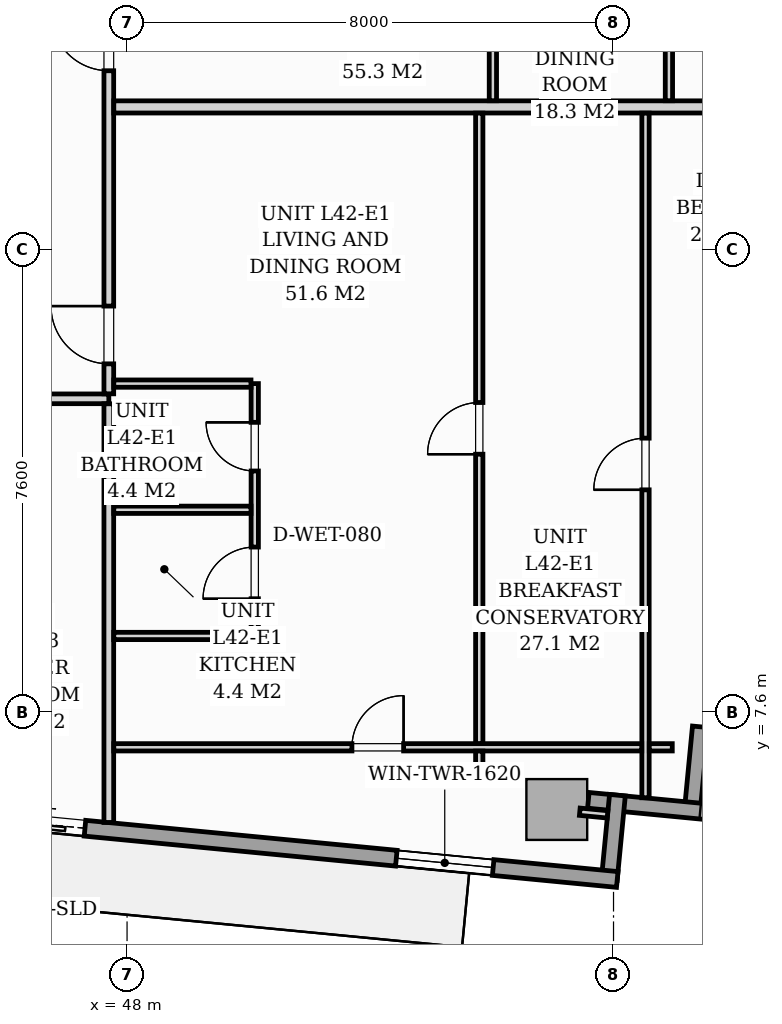
"""IFC4 building model, lengths in metres.
Left out: names, types, materials, properties, quantities, classifications, styles, units other than length and angle.
Written with IfcOpenShell. Run it as: python <this file> out.ifc"""

import sys

from ifc_helpers import new_model, si_unit, direction, frame, frame_2d, origin, origin_2d, place, context, subcontext, project, spatial, rectangle, extrude, source, transform, mapped, element, fill, save


model = new_model("IFC4")
c1 = context("Model", 3, precision=1e-05, world=origin(), true_north=direction((0.0, 1.0)))
c2 = subcontext(c1, "Body", "Model", "MODEL_VIEW")
j1 = project(units=[si_unit("LENGTHUNIT", "METRE"), si_unit("PLANEANGLEUNIT", "RADIAN")], contexts=[c1])
p1 = place(None, origin())
s1 = spatial("IfcSite", under=j1, at=p1, CompositionType="ELEMENT")
p2 = place(p1, origin())
s2 = spatial("IfcBuilding", under=s1, at=p2, CompositionType="ELEMENT")
p3 = place(p2, frame((0.0, 0.0, 147.0)))
s3 = spatial("IfcBuildingStorey", under=s2, at=p3, CompositionType="ELEMENT", Elevation=147.0)
m1 = source(origin(), c2, "Body", "SweptSolid", [
    extrude(rectangle(XDim=1.0, YDim=1.0, at=origin_2d()), origin(), (0.0, 0.0, 1.0), 3.196),
])
p4 = place(p3, frame((55.067, 5.996, 0.002), z_axis=(0.0, 0.0, 1.0), x_axis=(0.995396198367, -0.09584575252, 0.0)))
e1 = element("IfcColumn", 1, at=p4, inside=s3, PredefinedType="COLUMN", context=c2, shape_type="MappedRepresentation", body=[
    mapped(m1, transform((0.0, 0.0, 0.0), scale=1.0)),
])
p5 = place(p3, frame((57.428, 7.356, 0.0), z_axis=(0.0, 0.0, 1.0), x_axis=(-0.095915846097, -0.995389446633, 0.0)))
e2 = element("IfcWall", 2, at=p5, inside=s3, PredefinedType="STANDARD", context=c2, shape_type="SweptSolid", body=[
    extrude(rectangle(XDim=1.395, YDim=0.26, at=frame_2d((0.697, 0.0))), origin(), (0.0, 0.0, 1.0), 2.94),
])
p6 = place(p3, frame((57.555, 5.958, 0.0), z_axis=(0.0, 0.0, 1.0), x_axis=(-0.995401789159, 0.095787672171, 0.0)))
e3 = element("IfcWall", 3, at=p6, inside=s3, PredefinedType="STANDARD", context=c2, shape_type="SweptSolid", body=[
    extrude(rectangle(XDim=1.978, YDim=0.26, at=frame_2d((0.989, 0.0))), origin(), (0.0, 0.0, 1.0), 2.94),
])
p7 = place(p3, frame((56.064, 6.232, 0.0), z_axis=(0.0, 0.0, 1.0), x_axis=(-0.09589913835, -0.995391056452, 0.0)))
e4 = element("IfcWall", 4, at=p7, inside=s3, PredefinedType="STANDARD", context=c2, shape_type="SweptSolid", body=[
    extrude(rectangle(XDim=1.395, YDim=0.26, at=frame_2d((0.698, 0.0))), origin(), (0.0, 0.0, 1.0), 2.94),
])
p8 = place(p3, frame((56.061, 4.845, 0.0), z_axis=(0.0, 0.0, 1.0), x_axis=(-0.995395976631, 0.095848055311, 0.0)))
e5 = element("IfcWall", 5, at=p8, inside=s3, PredefinedType="STANDARD", context=c2, shape_type="SweptSolid", body=[
    extrude(rectangle(XDim=17.01, YDim=0.26, at=frame_2d((8.505, 0.0))), origin(), (0.0, 0.0, 1.0), 2.94),
])
p9 = place(p8, frame((8.794, 0.0, 0.0)))
e6 = element("IfcOpeningElement", 6, at=p9, cuts=e5, PredefinedType="OPENING", context=c2, shape_type="SweptSolid", body=[
    extrude(rectangle(XDim=1.8, YDim=2.06, at=frame_2d((0.9, 1.03))), frame((0.0, 0.14, 0.0), z_axis=(0.0, -1.0, 0.0), x_axis=(1.0, 0.0, 0.0)), (0.0, 0.0, 1.0), 0.28),
])
p10 = place(p8, frame((2.05, 0.0, 0.65)))
e7 = element("IfcOpeningElement", 7, at=p10, cuts=e5, PredefinedType="OPENING", context=c2, shape_type="SweptSolid", body=[
    extrude(rectangle(XDim=1.6, YDim=1.5, at=frame_2d((0.8, 0.75))), frame((0.0, 0.14, 0.0), z_axis=(0.0, -1.0, 0.0), x_axis=(1.0, 0.0, 0.0)), (0.0, 0.0, 1.0), 0.28),
])
p11 = place(p3, frame((22.05, 12.75, 0.0), z_axis=(0.0, 0.0, 1.0), x_axis=(1.0, 0.0, 0.0)))
e8 = element("IfcWall", 8, at=p11, inside=s3, PredefinedType="PARTITIONING", context=c2, shape_type="SweptSolid", body=[
    extrude(rectangle(XDim=25.65, YDim=0.16, at=frame_2d((12.825, 0.0))), origin(), (0.0, 0.0, 1.0), 2.94),
])
p12 = place(p11, frame((1.312, 0.0, 0.0)))
e9 = element("IfcOpeningElement", 9, at=p12, cuts=e8, PredefinedType="OPENING", context=c2, shape_type="SweptSolid", body=[
    extrude(rectangle(XDim=0.95, YDim=2.06, at=frame_2d((0.475, 1.03))), frame((0.0, 0.09, 0.0), z_axis=(0.0, -1.0, 0.0), x_axis=(1.0, 0.0, 0.0)), (0.0, 0.0, 1.0), 0.18),
])
p13 = place(p11, frame((8.281, 0.0, 0.0)))
e10 = element("IfcOpeningElement", 10, at=p13, cuts=e8, PredefinedType="OPENING", context=c2, shape_type="SweptSolid", body=[
    extrude(rectangle(XDim=0.95, YDim=2.06, at=frame_2d((0.475, 1.03))), frame((0.0, 0.09, 0.0), z_axis=(0.0, -1.0, 0.0), x_axis=(1.0, 0.0, 0.0)), (0.0, 0.0, 1.0), 0.18),
])
p14 = place(p11, frame((17.268, 0.0, 0.0)))
e11 = element("IfcOpeningElement", 11, at=p14, cuts=e8, PredefinedType="OPENING", context=c2, shape_type="SweptSolid", body=[
    extrude(rectangle(XDim=0.95, YDim=2.06, at=frame_2d((0.475, 1.03))), frame((0.0, 0.09, 0.0), z_axis=(0.0, -1.0, 0.0), x_axis=(1.0, 0.0, 0.0)), (0.0, 0.0, 1.0), 0.18),
])
p15 = place(p3, frame((47.7, 5.783, 0.0), z_axis=(0.0, 0.0, 1.0), x_axis=(0.0, 1.0, 0.0)))
e12 = element("IfcWall", 12, at=p15, inside=s3, PredefinedType="PARTITIONING", context=c2, shape_type="SweptSolid", body=[
    extrude(rectangle(XDim=6.885, YDim=0.16, at=frame_2d((3.442, 0.0))), origin(), (0.0, 0.0, 1.0), 2.94),
])
p16 = place(p3, frame((47.7, 12.832, 0.0), z_axis=(0.0, 0.0, 1.0), x_axis=(0.0, 1.0, 0.0)))
e13 = element("IfcWall", 13, at=p16, inside=s3, PredefinedType="PARTITIONING", context=c2, shape_type="SweptSolid", body=[
    extrude(rectangle(XDim=7.818, YDim=0.16, at=frame_2d((3.909, 0.0))), origin(), (0.0, 0.0, 1.0), 2.94),
])
p17 = place(p16, frame((0.493, 0.0, 0.0)))
e14 = element("IfcOpeningElement", 14, at=p17, cuts=e13, PredefinedType="OPENING", context=c2, shape_type="SweptSolid", body=[
    extrude(rectangle(XDim=0.95, YDim=2.06, at=frame_2d((0.475, 1.03))), frame((0.0, 0.09, 0.0), z_axis=(0.0, -1.0, 0.0), x_axis=(1.0, 0.0, 0.0)), (0.0, 0.0, 1.0), 0.18),
])
p18 = place(p16, frame((5.313, 0.0, 0.0)))
e15 = element("IfcOpeningElement", 15, at=p18, cuts=e13, PredefinedType="OPENING", context=c2, shape_type="SweptSolid", body=[
    extrude(rectangle(XDim=0.95, YDim=2.06, at=frame_2d((0.475, 1.03))), frame((0.0, 0.09, 0.0), z_axis=(0.0, -1.0, 0.0), x_axis=(1.0, 0.0, 0.0)), (0.0, 0.0, 1.0), 0.18),
])
p19 = place(p3, frame((47.782, 17.55, 0.0), z_axis=(0.0, 0.0, 1.0), x_axis=(1.0, 0.0, 0.0)))
e16 = element("IfcWall", 16, at=p19, inside=s3, PredefinedType="PARTITIONING", context=c2, shape_type="SweptSolid", body=[
    extrude(rectangle(XDim=11.934, YDim=0.2, at=frame_2d((5.967, 0.0))), origin(), (0.0, 0.0, 1.0), 2.94),
])
p20 = place(p3, frame((50.1, 8.85, 0.0), z_axis=(0.0, 0.0, 1.0), x_axis=(0.0, 1.0, 0.0)))
e17 = element("IfcWall", 17, at=p20, inside=s3, PredefinedType="PARTITIONING", context=c2, shape_type="SweptSolid", body=[
    extrude(rectangle(XDim=4.15, YDim=0.12, at=frame_2d((2.075, 0.0))), origin(), (0.0, 0.0, 1.0), 2.94),
])
p21 = place(p20, frame((0.612, 0.0, 0.0)))
e18 = element("IfcOpeningElement", 18, at=p21, cuts=e17, PredefinedType="OPENING", context=c2, shape_type="SweptSolid", body=[
    extrude(rectangle(XDim=0.85, YDim=2.05, at=frame_2d((0.425, 1.025))), frame((0.0, 0.07, 0.0), z_axis=(0.0, -1.0, 0.0), x_axis=(1.0, 0.0, 0.0)), (0.0, 0.0, 1.0), 0.14),
])
p22 = place(p20, frame((2.713, 0.0, 0.0)))
e19 = element("IfcOpeningElement", 19, at=p22, cuts=e17, PredefinedType="OPENING", context=c2, shape_type="SweptSolid", body=[
    extrude(rectangle(XDim=0.8, YDim=2.02, at=frame_2d((0.4, 1.01))), frame((0.0, 0.07, 0.0), z_axis=(0.0, -1.0, 0.0), x_axis=(1.0, 0.0, 0.0)), (0.0, 0.0, 1.0), 0.14),
])
for number, where, z_axis, x_axis in (
    (20, (47.782, 10.925, 0.0), (0.0, 0.0, 1.0), (1.0, 0.0, 0.0)),
    (21, (47.782, 8.85, 0.0), (0.0, 0.0, 1.0), (1.0, 0.0, 0.0)),
    (22, (47.782, 13.0, 0.0), (0.0, 0.0, 1.0), (1.0, 0.0, 0.0)),
):
    element("IfcWall", number, at=place(p3, frame(where, z_axis=z_axis, x_axis=x_axis)), inside=s3, PredefinedType="PARTITIONING", context=c2, shape_type="SweptSolid", body=[
        extrude(rectangle(XDim=2.256, YDim=0.12, at=frame_2d((1.128, 0.0))), origin(), (0.0, 0.0, 1.0), 2.94),
    ])
p23 = place(p3, frame((56.526, 6.189, 0.0), z_axis=(0.0, 0.0, 1.0), x_axis=(0.0, 1.0, 0.0)))
e23 = element("IfcWall", 23, at=p23, inside=s3, PredefinedType="PARTITIONING", context=c2, shape_type="SweptSolid", body=[
    extrude(rectangle(XDim=11.259, YDim=0.12, at=frame_2d((5.629, 0.0))), origin(), (0.0, 0.0, 1.0), 2.94),
])
p24 = place(p23, frame((5.064, 0.0, 0.0)))
e24 = element("IfcOpeningElement", 24, at=p24, cuts=e23, PredefinedType="OPENING", context=c2, shape_type="SweptSolid", body=[
    extrude(rectangle(XDim=0.85, YDim=2.05, at=frame_2d((0.425, 1.025))), frame((0.0, 0.07, 0.0), z_axis=(0.0, -1.0, 0.0), x_axis=(1.0, 0.0, 0.0)), (0.0, 0.0, 1.0), 0.14),
])
p25 = place(p3, frame((47.782, 7.019, 0.0), z_axis=(0.0, 0.0, 1.0), x_axis=(1.0, 0.0, 0.0)))
e25 = element("IfcWall", 25, at=p25, inside=s3, PredefinedType="PARTITIONING", context=c2, shape_type="SweptSolid", body=[
    extrude(rectangle(XDim=8.682, YDim=0.12, at=frame_2d((4.341, 0.0))), origin(), (0.0, 0.0, 1.0), 2.94),
])
p26 = place(p25, frame((3.916, 0.0, 0.0)))
e26 = element("IfcOpeningElement", 26, at=p26, cuts=e25, PredefinedType="OPENING", context=c2, shape_type="SweptSolid", body=[
    extrude(rectangle(XDim=0.85, YDim=2.05, at=frame_2d((0.425, 1.025))), frame((0.0, 0.07, 0.0), z_axis=(0.0, -1.0, 0.0), x_axis=(1.0, 0.0, 0.0)), (0.0, 0.0, 1.0), 0.14),
])
p27 = place(p3, frame((56.588, 7.019, 0.0), z_axis=(0.0, 0.0, 1.0), x_axis=(1.0, 0.0, 0.0)))
e27 = element("IfcWall", 27, at=p27, inside=s3, PredefinedType="PARTITIONING", context=c2, shape_type="SweptSolid", body=[
    extrude(rectangle(XDim=0.378, YDim=0.12, at=frame_2d((0.189, 0.0))), origin(), (0.0, 0.0, 1.0), 2.94),
])
p28 = place(p3, frame((53.792, 6.579, 0.0), z_axis=(0.0, 0.0, 1.0), x_axis=(0.0, 1.0, 0.0)))
e28 = element("IfcWall", 28, at=p28, inside=s3, PredefinedType="PARTITIONING", context=c2, shape_type="SweptSolid", body=[
    extrude(rectangle(XDim=0.378, YDim=0.12, at=frame_2d((0.189, 0.0))), origin(), (0.0, 0.0, 1.0), 2.94),
])
p29 = place(p3, frame((53.792, 7.081, 0.0), z_axis=(0.0, 0.0, 1.0), x_axis=(0.0, 1.0, 0.0)))
e29 = element("IfcWall", 29, at=p29, inside=s3, PredefinedType="PARTITIONING", context=c2, shape_type="SweptSolid", body=[
    extrude(rectangle(XDim=10.367, YDim=0.12, at=frame_2d((5.184, 0.0))), origin(), (0.0, 0.0, 1.0), 2.94),
])
p30 = place(p29, frame((4.758, 0.0, 0.0)))
e30 = element("IfcOpeningElement", 30, at=p30, cuts=e29, PredefinedType="OPENING", context=c2, shape_type="SweptSolid", body=[
    extrude(rectangle(XDim=0.85, YDim=2.05, at=frame_2d((0.425, 1.025))), frame((0.0, 0.07, 0.0), z_axis=(0.0, -1.0, 0.0), x_axis=(1.0, 0.0, 0.0)), (0.0, 0.0, 1.0), 0.14),
])
p31 = place(p3, frame((56.911, 17.652, 0.0), z_axis=(0.0, 0.0, 1.0), x_axis=(0.0, 1.0, 0.0)))
e31 = element("IfcWall", 31, at=p31, inside=s3, PredefinedType="PARTITIONING", context=c2, shape_type="SweptSolid", body=[
    extrude(rectangle(XDim=6.408, YDim=0.12, at=frame_2d((3.204, 0.0))), origin(), (0.0, 0.0, 1.0), 2.383),
])
p32 = place(p31, frame((2.266, 0.0, 0.0)))
e32 = element("IfcOpeningElement", 32, at=p32, cuts=e31, PredefinedType="OPENING", context=c2, shape_type="SweptSolid", body=[
    extrude(rectangle(XDim=0.85, YDim=2.05, at=frame_2d((0.425, 1.025))), frame((0.0, 0.07, 0.0), z_axis=(0.0, -1.0, 0.0), x_axis=(1.0, 0.0, 0.0)), (0.0, 0.0, 1.0), 0.14),
])
p33 = place(p3, frame((54.016, 17.652, 0.0), z_axis=(0.0, 0.0, 1.0), x_axis=(0.0, 1.0, 0.0)))
e33 = element("IfcWall", 33, at=p33, inside=s3, PredefinedType="PARTITIONING", context=c2, shape_type="SweptSolid", body=[
    extrude(rectangle(XDim=6.687, YDim=0.12, at=frame_2d((3.344, 0.0))), origin(), (0.0, 0.0, 1.0), 2.94),
])
p34 = place(p33, frame((3.016, 0.0, 0.0)))
e34 = element("IfcOpeningElement", 34, at=p34, cuts=e33, PredefinedType="OPENING", context=c2, shape_type="SweptSolid", body=[
    extrude(rectangle(XDim=0.85, YDim=2.05, at=frame_2d((0.425, 1.025))), frame((0.0, 0.07, 0.0), z_axis=(0.0, -1.0, 0.0), x_axis=(1.0, 0.0, 0.0)), (0.0, 0.0, 1.0), 0.14),
])
p35 = place(p3, frame((55.445, 5.96, 0.0), z_axis=(0.0, 0.0, 1.0), x_axis=(0.995384576284, -0.09596637586, 0.0)))
e35 = element("IfcWall", 35, at=p35, inside=s3, PredefinedType="PARTITIONING", context=c2, shape_type="SweptSolid", body=[
    extrude(rectangle(XDim=0.458, YDim=0.12, at=frame_2d((0.229, 0.0))), origin(), (0.0, 0.0, 1.0), 2.94),
])
m2 = source(origin(), c2, "Body", "SweptSolid", [
    extrude(rectangle(XDim=1.8, YDim=2.06, at=frame_2d((0.9, 1.03))), frame((0.0, 0.025, 0.0), z_axis=(0.0, -1.0, 0.0), x_axis=(1.0, 0.0, 0.0)), (0.0, 0.0, 1.0), 0.05),
])
p36 = place(p9, origin())
e36 = element("IfcDoor", 36, at=p36, inside=s3, OperationType="SLIDING_TO_RIGHT", PredefinedType="DOOR", context=c2, shape_type="MappedRepresentation", body=[
    mapped(m2, transform((0.0, 0.0, 0.0), scale=1.0)),
])
fill(e6, e36)
m3 = source(origin(), c2, "Body", "SweptSolid", [
    extrude(rectangle(XDim=1.6, YDim=1.5, at=frame_2d((0.8, 0.75))), frame((0.0, 0.03, 0.0), z_axis=(0.0, -1.0, 0.0), x_axis=(1.0, 0.0, 0.0)), (0.0, 0.0, 1.0), 0.06),
])
p37 = place(p10, origin())
e37 = element("IfcWindow", 37, at=p37, inside=s3, PartitioningType="SINGLE_PANEL", PredefinedType="WINDOW", context=c2, shape_type="MappedRepresentation", body=[
    mapped(m3, transform((0.0, 0.0, 0.0), scale=1.0)),
])
fill(e7, e37)
m4 = source(origin(), c2, "Body", "SweptSolid", [
    extrude(rectangle(XDim=0.95, YDim=2.06, at=frame_2d((0.475, 1.03))), frame((0.0, 0.025, 0.0), z_axis=(0.0, -1.0, 0.0), x_axis=(1.0, 0.0, 0.0)), (0.0, 0.0, 1.0), 0.05),
])
p38 = place(p17, origin())
e38 = element("IfcDoor", 38, at=p38, inside=s3, OperationType="SINGLE_SWING_RIGHT", PredefinedType="DOOR", context=c2, shape_type="MappedRepresentation", body=[
    mapped(m4, transform((0.0, 0.0, 0.0), scale=1.0)),
])
fill(e14, e38)
m5 = source(origin(), c2, "Body", "SweptSolid", [
    extrude(rectangle(XDim=0.85, YDim=2.05, at=frame_2d((0.425, 1.025))), frame((0.0, 0.025, 0.0), z_axis=(0.0, -1.0, 0.0), x_axis=(1.0, 0.0, 0.0)), (0.0, 0.0, 1.0), 0.05),
])
p39 = place(p21, origin())
e39 = element("IfcDoor", 39, at=p39, inside=s3, OperationType="SINGLE_SWING_LEFT", PredefinedType="DOOR", context=c2, shape_type="MappedRepresentation", body=[
    mapped(m5, transform((0.0, 0.0, 0.0), scale=1.0)),
])
fill(e18, e39)
m6 = source(origin(), c2, "Body", "SweptSolid", [
    extrude(rectangle(XDim=0.8, YDim=2.02, at=frame_2d((0.4, 1.01))), frame((0.0, 0.025, 0.0), z_axis=(0.0, -1.0, 0.0), x_axis=(1.0, 0.0, 0.0)), (0.0, 0.0, 1.0), 0.05),
])
p40 = place(p22, origin())
e40 = element("IfcDoor", 40, at=p40, inside=s3, OperationType="SINGLE_SWING_RIGHT", PredefinedType="DOOR", context=c2, shape_type="MappedRepresentation", body=[
    mapped(m6, transform((0.0, 0.0, 0.0), scale=1.0)),
])
fill(e19, e40)
p41 = place(p24, origin())
e41 = element("IfcDoor", 41, at=p41, inside=s3, OperationType="SINGLE_SWING_LEFT", PredefinedType="DOOR", context=c2, shape_type="MappedRepresentation", body=[
    mapped(m5, transform((0.0, 0.0, 0.0), scale=1.0)),
])
fill(e24, e41)
p42 = place(p26, origin())
e42 = element("IfcDoor", 42, at=p42, inside=s3, OperationType="SINGLE_SWING_RIGHT", PredefinedType="DOOR", context=c2, shape_type="MappedRepresentation", body=[
    mapped(m5, transform((0.0, 0.0, 0.0), scale=1.0)),
])
fill(e26, e42)
p43 = place(p30, origin())
e43 = element("IfcDoor", 43, at=p43, inside=s3, OperationType="SINGLE_SWING_LEFT", PredefinedType="DOOR", context=c2, shape_type="MappedRepresentation", body=[
    mapped(m5, transform((0.0, 0.0, 0.0), scale=1.0)),
])
fill(e30, e43)
p44 = place(p18, origin())
e44 = element("IfcDoor", 44, at=p44, inside=s3, OperationType="SINGLE_SWING_RIGHT", PredefinedType="DOOR", context=c2, shape_type="MappedRepresentation", body=[
    mapped(m4, transform((0.0, 0.0, 0.0), scale=1.0)),
])
fill(e15, e44)
save(model, sys.argv[1])
